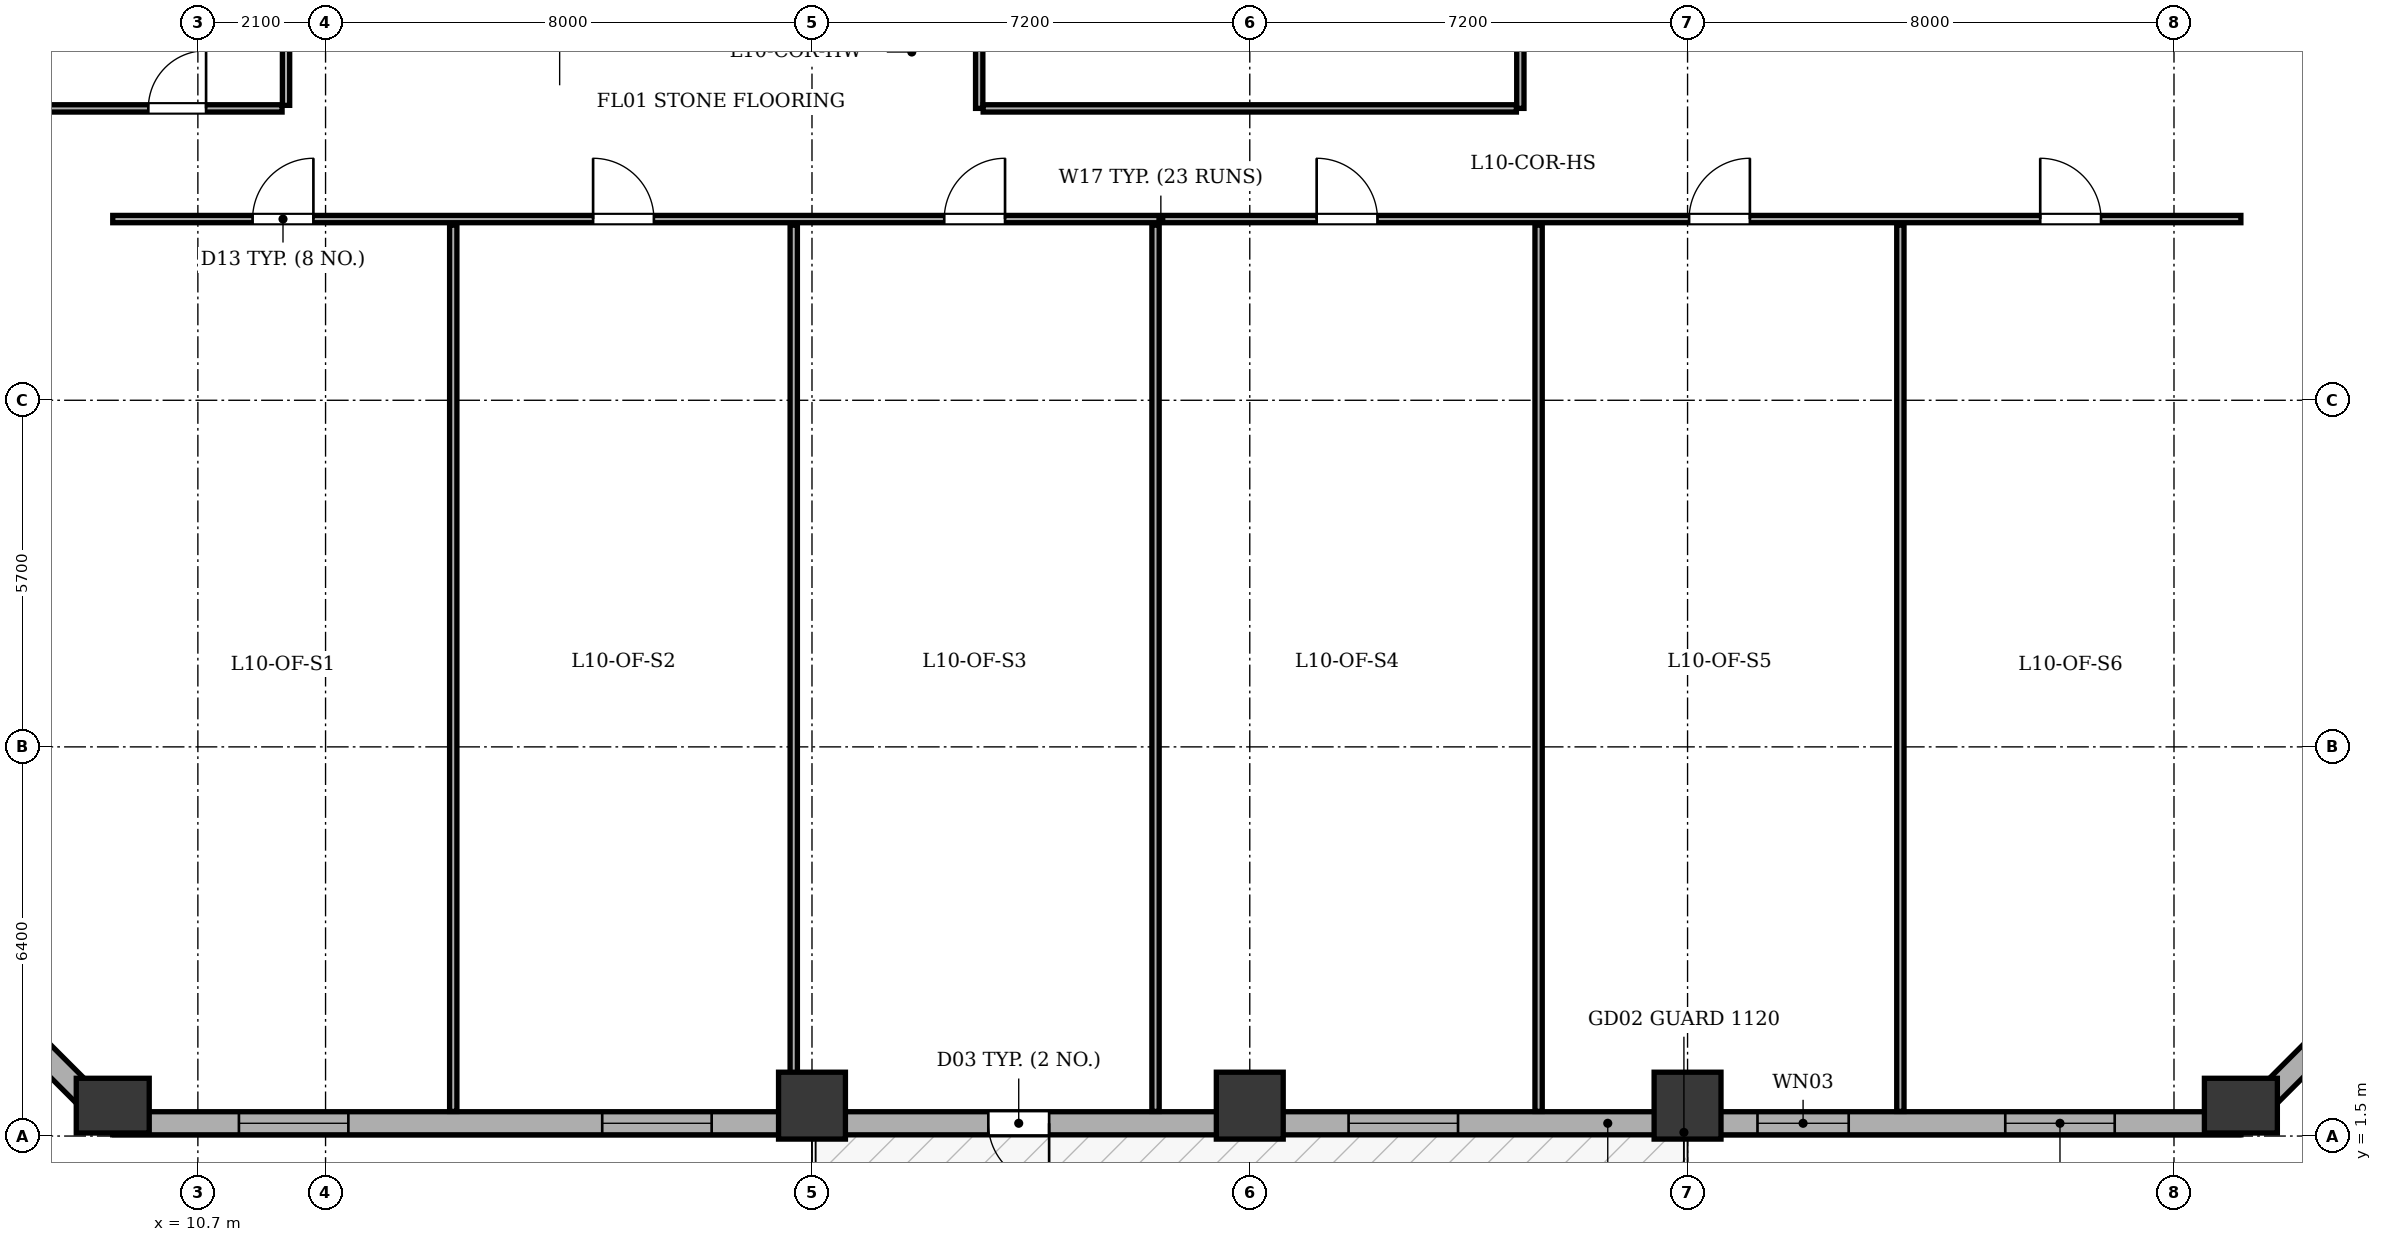
"""IFC4 building model, lengths in metres.
Left out: names, types, materials, properties, quantities, classifications, styles, units other than length and angle.
Written with IfcOpenShell. Run it as: python <this file> out.ifc"""

import sys

from ifc_helpers import new_model, si_unit, direction, frame, frame_2d, origin, origin_2d, place, context, subcontext, project, spatial, rectangle, extrude, element, fill, save


model = new_model("IFC4")
c1 = context("Model", 3, precision=1e-05, world=origin(), true_north=direction((0.0, 1.0)))
c2 = subcontext(c1, "Body", "Model", "MODEL_VIEW")
j1 = project(units=[si_unit("LENGTHUNIT", "METRE"), si_unit("PLANEANGLEUNIT", "RADIAN")], contexts=[c1])
p1 = place(None, origin())
s1 = spatial("IfcSite", under=j1, at=p1, CompositionType="ELEMENT")
p2 = place(p1, origin())
s2 = spatial("IfcBuilding", under=s1, at=p2, CompositionType="ELEMENT")
p3 = place(p2, frame((0.0, 0.0, 43.8)))
s3 = spatial("IfcBuildingStorey", under=s2, at=p3, CompositionType="ELEMENT", Elevation=43.8)
p4 = place(p3, frame((9.3, 2.0, 0.0), z_axis=(0.0, 0.0, 1.0), x_axis=(1.0, 0.0, 0.0)))
e1 = element("IfcColumn", 1, at=p4, inside=s3, PredefinedType="COLUMN", context=c2, shape_type="SweptSolid", body=[
    extrude(rectangle(XDim=0.9, YDim=1.2, at=origin_2d()), origin(), (0.0, 0.0, 1.0), 3.9),
])
for number, where, z_axis, x_axis in (
    (2, (20.8, 2.0, 0.0), (0.0, 0.0, 1.0), (1.0, 0.0, 0.0)),
    (3, (28.0, 2.0, 0.0), (0.0, 0.0, 1.0), (1.0, 0.0, 0.0)),
    (4, (35.2, 2.0, 0.0), (0.0, 0.0, 1.0), (1.0, 0.0, 0.0)),
):
    element("IfcColumn", number, at=place(p3, frame(where, z_axis=z_axis, x_axis=x_axis)), inside=s3, PredefinedType="COLUMN", context=c2, shape_type="SweptSolid", body=[
        extrude(rectangle(XDim=1.1, YDim=1.1, at=origin_2d()), origin(), (0.0, 0.0, 1.0), 3.9),
    ])
p5 = place(p3, frame((44.3, 2.0, 0.0), z_axis=(0.0, 0.0, 1.0), x_axis=(1.0, 0.0, 0.0)))
e5 = element("IfcColumn", 5, at=p5, inside=s3, PredefinedType="COLUMN", context=c2, shape_type="SweptSolid", body=[
    extrude(rectangle(XDim=0.9, YDim=1.2, at=origin_2d()), origin(), (0.0, 0.0, 1.0), 3.9),
])
p6 = place(p3, frame((44.3, 1.71, 0.0), z_axis=(0.0, 0.0, 1.0), x_axis=(-1.0, 0.0, 0.0)))
e6 = element("IfcWall", 6, at=p6, inside=s3, PredefinedType="STANDARD", context=c2, shape_type="SweptSolid", body=[
    extrude(rectangle(XDim=35.0, YDim=0.38, at=frame_2d((17.5, 0.0))), origin(), (0.0, 0.0, 1.0), 2.835),
])
p7 = place(p6, frame((19.6, 0.0, 0.0)))
e7 = element("IfcOpeningElement", 7, at=p7, cuts=e6, PredefinedType="OPENING", context=c2, shape_type="SweptSolid", body=[
    extrude(rectangle(XDim=1.0, YDim=2.02, at=frame_2d((0.5, 1.01))), frame((0.0, 0.2, 0.0), z_axis=(0.0, -1.0, 0.0), x_axis=(1.0, 0.0, 0.0)), (0.0, 0.0, 1.0), 0.4),
])
p8 = place(p6, frame((2.075, 0.0, 0.8)))
e8 = element("IfcOpeningElement", 8, at=p8, cuts=e6, PredefinedType="OPENING", context=c2, shape_type="SweptSolid", body=[
    extrude(rectangle(XDim=1.8, YDim=1.9, at=frame_2d((0.9, 0.95))), frame((0.0, 0.2, 0.0), z_axis=(0.0, -1.0, 0.0), x_axis=(1.0, 0.0, 0.0)), (0.0, 0.0, 1.0), 0.4),
])
p9 = place(p6, frame((6.45, 0.0, 0.8)))
e9 = element("IfcOpeningElement", 9, at=p9, cuts=e6, PredefinedType="OPENING", context=c2, shape_type="SweptSolid", body=[
    extrude(rectangle(XDim=1.5, YDim=1.9, at=frame_2d((0.75, 0.95))), frame((0.0, 0.2, 0.0), z_axis=(0.0, -1.0, 0.0), x_axis=(1.0, 0.0, 0.0)), (0.0, 0.0, 1.0), 0.4),
])
p10 = place(p6, frame((12.875, 0.0, 0.8)))
e10 = element("IfcOpeningElement", 10, at=p10, cuts=e6, PredefinedType="OPENING", context=c2, shape_type="SweptSolid", body=[
    extrude(rectangle(XDim=1.8, YDim=1.9, at=frame_2d((0.9, 0.95))), frame((0.0, 0.2, 0.0), z_axis=(0.0, -1.0, 0.0), x_axis=(1.0, 0.0, 0.0)), (0.0, 0.0, 1.0), 0.4),
])
p11 = place(p6, frame((25.15, 0.0, 0.8)))
e11 = element("IfcOpeningElement", 11, at=p11, cuts=e6, PredefinedType="OPENING", context=c2, shape_type="SweptSolid", body=[
    extrude(rectangle(XDim=1.8, YDim=1.9, at=frame_2d((0.9, 0.95))), frame((0.0, 0.2, 0.0), z_axis=(0.0, -1.0, 0.0), x_axis=(1.0, 0.0, 0.0)), (0.0, 0.0, 1.0), 0.4),
])
p12 = place(p6, frame((31.125, 0.0, 0.8)))
e12 = element("IfcOpeningElement", 12, at=p12, cuts=e6, PredefinedType="OPENING", context=c2, shape_type="SweptSolid", body=[
    extrude(rectangle(XDim=1.8, YDim=1.9, at=frame_2d((0.9, 0.95))), frame((0.0, 0.2, 0.0), z_axis=(0.0, -1.0, 0.0), x_axis=(1.0, 0.0, 0.0)), (0.0, 0.0, 1.0), 0.4),
])
p13 = place(p3, frame((9.3, 1.71, 0.0), z_axis=(0.0, 0.0, 1.0), x_axis=(-0.707106781187, 0.707106781187, 0.0)))
e13 = element("IfcWall", 13, at=p13, inside=s3, PredefinedType="STANDARD", context=c2, shape_type="SweptSolid", body=[
    extrude(rectangle(XDim=6.774, YDim=0.38, at=frame_2d((3.387, 0.0))), origin(), (0.0, 0.0, 1.0), 2.835),
])
p14 = place(p13, frame((2.687, 0.0, 0.8)))
e14 = element("IfcOpeningElement", 14, at=p14, cuts=e13, PredefinedType="OPENING", context=c2, shape_type="SweptSolid", body=[
    extrude(rectangle(XDim=1.4, YDim=1.65, at=frame_2d((0.7, 0.825))), frame((0.0, 0.2, 0.0), z_axis=(0.0, -1.0, 0.0), x_axis=(1.0, 0.0, 0.0)), (0.0, 0.0, 1.0), 0.4),
])
p15 = place(p3, frame((49.09, 6.5, 0.0), z_axis=(0.0, 0.0, 1.0), x_axis=(-0.707106781187, -0.707106781187, 0.0)))
e15 = element("IfcWall", 15, at=p15, inside=s3, PredefinedType="STANDARD", context=c2, shape_type="SweptSolid", body=[
    extrude(rectangle(XDim=6.774, YDim=0.38, at=frame_2d((3.387, 0.0))), origin(), (0.0, 0.0, 1.0), 2.835),
])
p16 = place(p15, frame((2.687, 0.0, 0.8)))
e16 = element("IfcOpeningElement", 16, at=p16, cuts=e15, PredefinedType="OPENING", context=c2, shape_type="SweptSolid", body=[
    extrude(rectangle(XDim=1.4, YDim=1.65, at=frame_2d((0.7, 0.825))), frame((0.0, 0.2, 0.0), z_axis=(0.0, -1.0, 0.0), x_axis=(1.0, 0.0, 0.0)), (0.0, 0.0, 1.0), 0.4),
])
for number, where, z_axis, x_axis in (
    (17, (23.55, 18.4, 0.0), (0.0, 0.0, 1.0), (0.0, 1.0, 0.0)),
    (18, (32.45, 18.4, 0.0), (0.0, 0.0, 1.0), (0.0, 1.0, 0.0)),
):
    element("IfcWall", number, at=place(p3, frame(where, z_axis=z_axis, x_axis=x_axis)), inside=s3, PredefinedType="PARTITIONING", context=c2, shape_type="SweptSolid", body=[
        extrude(rectangle(XDim=3.485, YDim=0.12, at=frame_2d((1.743, 0.0))), origin(), (0.0, 0.0, 1.0), 3.45),
    ])
p17 = place(p3, frame((23.615, 18.4, 0.0), z_axis=(0.0, 0.0, 1.0), x_axis=(1.0, 0.0, 0.0)))
e19 = element("IfcWall", 19, at=p17, inside=s3, PredefinedType="PARTITIONING", context=c2, shape_type="SweptSolid", body=[
    extrude(rectangle(XDim=8.77, YDim=0.12, at=frame_2d((4.385, 0.0))), origin(), (0.0, 0.0, 1.0), 3.45),
])
p18 = place(p3, frame((9.3, 16.58, 0.0), z_axis=(0.0, 0.0, 1.0), x_axis=(1.0, 0.0, 0.0)))
e20 = element("IfcWall", 20, at=p18, inside=s3, PredefinedType="PARTITIONING", context=c2, shape_type="SweptSolid", body=[
    extrude(rectangle(XDim=35.0, YDim=0.12, at=frame_2d((17.5, 0.0))), origin(), (0.0, 0.0, 1.0), 3.45),
])
p19 = place(p18, frame((2.3, 0.0, 0.0)))
e21 = element("IfcOpeningElement", 21, at=p19, cuts=e20, PredefinedType="OPENING", context=c2, shape_type="SweptSolid", body=[
    extrude(rectangle(XDim=1.0, YDim=2.1, at=frame_2d((0.5, 1.05))), frame((0.0, 0.07, 0.0), z_axis=(0.0, -1.0, 0.0), x_axis=(1.0, 0.0, 0.0)), (0.0, 0.0, 1.0), 0.14),
])
p20 = place(p18, frame((7.9, 0.0, 0.0)))
e22 = element("IfcOpeningElement", 22, at=p20, cuts=e20, PredefinedType="OPENING", context=c2, shape_type="SweptSolid", body=[
    extrude(rectangle(XDim=1.0, YDim=2.1, at=frame_2d((0.5, 1.05))), frame((0.0, 0.07, 0.0), z_axis=(0.0, -1.0, 0.0), x_axis=(1.0, 0.0, 0.0)), (0.0, 0.0, 1.0), 0.14),
])
p21 = place(p18, frame((13.675, 0.0, 0.0)))
e23 = element("IfcOpeningElement", 23, at=p21, cuts=e20, PredefinedType="OPENING", context=c2, shape_type="SweptSolid", body=[
    extrude(rectangle(XDim=1.0, YDim=2.1, at=frame_2d((0.5, 1.05))), frame((0.0, 0.07, 0.0), z_axis=(0.0, -1.0, 0.0), x_axis=(1.0, 0.0, 0.0)), (0.0, 0.0, 1.0), 0.14),
])
p22 = place(p18, frame((19.8, 0.0, 0.0)))
e24 = element("IfcOpeningElement", 24, at=p22, cuts=e20, PredefinedType="OPENING", context=c2, shape_type="SweptSolid", body=[
    extrude(rectangle(XDim=1.0, YDim=2.1, at=frame_2d((0.5, 1.05))), frame((0.0, 0.07, 0.0), z_axis=(0.0, -1.0, 0.0), x_axis=(1.0, 0.0, 0.0)), (0.0, 0.0, 1.0), 0.14),
])
p23 = place(p18, frame((25.925, 0.0, 0.0)))
e25 = element("IfcOpeningElement", 25, at=p23, cuts=e20, PredefinedType="OPENING", context=c2, shape_type="SweptSolid", body=[
    extrude(rectangle(XDim=1.0, YDim=2.1, at=frame_2d((0.5, 1.05))), frame((0.0, 0.07, 0.0), z_axis=(0.0, -1.0, 0.0), x_axis=(1.0, 0.0, 0.0)), (0.0, 0.0, 1.0), 0.14),
])
p24 = place(p18, frame((31.7, 0.0, 0.0)))
e26 = element("IfcOpeningElement", 26, at=p24, cuts=e20, PredefinedType="OPENING", context=c2, shape_type="SweptSolid", body=[
    extrude(rectangle(XDim=1.0, YDim=2.1, at=frame_2d((0.5, 1.05))), frame((0.0, 0.07, 0.0), z_axis=(0.0, -1.0, 0.0), x_axis=(1.0, 0.0, 0.0)), (0.0, 0.0, 1.0), 0.14),
])
for number, where, z_axis, x_axis in (
    (27, (14.9, 1.905, 0.0), (0.0, 0.0, 1.0), (0.0, 1.0, 0.0)),
    (28, (20.5, 1.905, 0.0), (0.0, 0.0, 1.0), (0.0, 1.0, 0.0)),
    (29, (26.45, 1.905, 0.0), (0.0, 0.0, 1.0), (0.0, 1.0, 0.0)),
    (30, (32.75, 1.905, 0.0), (0.0, 0.0, 1.0), (0.0, 1.0, 0.0)),
    (31, (38.7, 1.905, 0.0), (0.0, 0.0, 1.0), (0.0, 1.0, 0.0)),
):
    element("IfcWall", number, at=place(p3, frame(where, z_axis=z_axis, x_axis=x_axis)), inside=s3, PredefinedType="PARTITIONING", context=c2, shape_type="SweptSolid", body=[
        extrude(rectangle(XDim=14.575, YDim=0.12, at=frame_2d((7.288, 0.0))), origin(), (0.0, 0.0, 1.0), 3.45),
    ])
p25 = place(p3, frame((12.15, 18.45, 0.0), z_axis=(0.0, 0.0, 1.0), x_axis=(0.0, 1.0, 0.0)))
e32 = element("IfcWall", 32, at=p25, inside=s3, PredefinedType="PARTITIONING", context=c2, shape_type="SweptSolid", body=[
    extrude(rectangle(XDim=17.5, YDim=0.12, at=frame_2d((8.75, 0.0))), origin(), (0.0, 0.0, 1.0), 3.45),
])
p26 = place(p3, frame((4.705, 18.4, 0.0), z_axis=(0.0, 0.0, 1.0), x_axis=(1.0, 0.0, 0.0)))
e33 = element("IfcWall", 33, at=p26, inside=s3, PredefinedType="PARTITIONING", context=c2, shape_type="SweptSolid", body=[
    extrude(rectangle(XDim=7.38, YDim=0.12, at=frame_2d((3.69, 0.0))), origin(), (0.0, 0.0, 1.0), 3.45),
])
p27 = place(p26, frame((5.18, 0.0, 0.0)))
e34 = element("IfcOpeningElement", 34, at=p27, cuts=e33, PredefinedType="OPENING", context=c2, shape_type="SweptSolid", body=[
    extrude(rectangle(XDim=0.95, YDim=2.1, at=frame_2d((0.475, 1.05))), frame((0.0, 0.07, 0.0), z_axis=(0.0, -1.0, 0.0), x_axis=(1.0, 0.0, 0.0)), (0.0, 0.0, 1.0), 0.14),
])
p28 = place(p7, origin())
e35 = element("IfcDoor", 35, at=p28, inside=s3, OperationType="SINGLE_SWING_LEFT", PredefinedType="DOOR", context=c2, shape_type="SweptSolid", body=[
    extrude(rectangle(XDim=1.0, YDim=2.02, at=frame_2d((0.5, 1.01))), frame((0.0, 0.025, 0.0), z_axis=(0.0, -1.0, 0.0), x_axis=(1.0, 0.0, 0.0)), (0.0, 0.0, 1.0), 0.05),
])
fill(e7, e35)
p29 = place(p8, origin())
e36 = element("IfcWindow", 36, at=p29, inside=s3, PartitioningType="SINGLE_PANEL", PredefinedType="WINDOW", context=c2, shape_type="SweptSolid", body=[
    extrude(rectangle(XDim=1.8, YDim=1.9, at=frame_2d((0.9, 0.95))), frame((0.0, -0.01, 0.0), z_axis=(0.0, -1.0, 0.0), x_axis=(1.0, 0.0, 0.0)), (0.0, 0.0, 1.0), 0.06),
])
fill(e8, e36)
p30 = place(p9, origin())
e37 = element("IfcWindow", 37, at=p30, inside=s3, PartitioningType="SINGLE_PANEL", PredefinedType="WINDOW", context=c2, shape_type="SweptSolid", body=[
    extrude(rectangle(XDim=1.5, YDim=1.9, at=frame_2d((0.75, 0.95))), frame((0.0, -0.01, 0.0), z_axis=(0.0, -1.0, 0.0), x_axis=(1.0, 0.0, 0.0)), (0.0, 0.0, 1.0), 0.06),
])
fill(e9, e37)
p31 = place(p10, origin())
e38 = element("IfcWindow", 38, at=p31, inside=s3, PartitioningType="SINGLE_PANEL", PredefinedType="WINDOW", context=c2, shape_type="SweptSolid", body=[
    extrude(rectangle(XDim=1.8, YDim=1.9, at=frame_2d((0.9, 0.95))), frame((0.0, -0.01, 0.0), z_axis=(0.0, -1.0, 0.0), x_axis=(1.0, 0.0, 0.0)), (0.0, 0.0, 1.0), 0.06),
])
fill(e10, e38)
p32 = place(p11, origin())
e39 = element("IfcWindow", 39, at=p32, inside=s3, PartitioningType="SINGLE_PANEL", PredefinedType="WINDOW", context=c2, shape_type="SweptSolid", body=[
    extrude(rectangle(XDim=1.8, YDim=1.9, at=frame_2d((0.9, 0.95))), frame((0.0, -0.01, 0.0), z_axis=(0.0, -1.0, 0.0), x_axis=(1.0, 0.0, 0.0)), (0.0, 0.0, 1.0), 0.06),
])
fill(e11, e39)
p33 = place(p12, origin())
e40 = element("IfcWindow", 40, at=p33, inside=s3, PartitioningType="SINGLE_PANEL", PredefinedType="WINDOW", context=c2, shape_type="SweptSolid", body=[
    extrude(rectangle(XDim=1.8, YDim=1.9, at=frame_2d((0.9, 0.95))), frame((0.0, -0.01, 0.0), z_axis=(0.0, -1.0, 0.0), x_axis=(1.0, 0.0, 0.0)), (0.0, 0.0, 1.0), 0.06),
])
fill(e12, e40)
p34 = place(p19, origin())
e41 = element("IfcDoor", 41, at=p34, inside=s3, OperationType="SINGLE_SWING_RIGHT", PredefinedType="DOOR", context=c2, shape_type="SweptSolid", body=[
    extrude(rectangle(XDim=1.0, YDim=2.1, at=frame_2d((0.5, 1.05))), frame((0.0, 0.025, 0.0), z_axis=(0.0, -1.0, 0.0), x_axis=(1.0, 0.0, 0.0)), (0.0, 0.0, 1.0), 0.05),
])
fill(e21, e41)
p35 = place(p20, origin())
e42 = element("IfcDoor", 42, at=p35, inside=s3, OperationType="SINGLE_SWING_LEFT", PredefinedType="DOOR", context=c2, shape_type="SweptSolid", body=[
    extrude(rectangle(XDim=1.0, YDim=2.1, at=frame_2d((0.5, 1.05))), frame((0.0, 0.025, 0.0), z_axis=(0.0, -1.0, 0.0), x_axis=(1.0, 0.0, 0.0)), (0.0, 0.0, 1.0), 0.05),
])
fill(e22, e42)
p36 = place(p21, origin())
e43 = element("IfcDoor", 43, at=p36, inside=s3, OperationType="SINGLE_SWING_RIGHT", PredefinedType="DOOR", context=c2, shape_type="SweptSolid", body=[
    extrude(rectangle(XDim=1.0, YDim=2.1, at=frame_2d((0.5, 1.05))), frame((0.0, 0.025, 0.0), z_axis=(0.0, -1.0, 0.0), x_axis=(1.0, 0.0, 0.0)), (0.0, 0.0, 1.0), 0.05),
])
fill(e23, e43)
p37 = place(p22, origin())
e44 = element("IfcDoor", 44, at=p37, inside=s3, OperationType="SINGLE_SWING_LEFT", PredefinedType="DOOR", context=c2, shape_type="SweptSolid", body=[
    extrude(rectangle(XDim=1.0, YDim=2.1, at=frame_2d((0.5, 1.05))), frame((0.0, 0.025, 0.0), z_axis=(0.0, -1.0, 0.0), x_axis=(1.0, 0.0, 0.0)), (0.0, 0.0, 1.0), 0.05),
])
fill(e24, e44)
p38 = place(p23, origin())
e45 = element("IfcDoor", 45, at=p38, inside=s3, OperationType="SINGLE_SWING_RIGHT", PredefinedType="DOOR", context=c2, shape_type="SweptSolid", body=[
    extrude(rectangle(XDim=1.0, YDim=2.1, at=frame_2d((0.5, 1.05))), frame((0.0, 0.025, 0.0), z_axis=(0.0, -1.0, 0.0), x_axis=(1.0, 0.0, 0.0)), (0.0, 0.0, 1.0), 0.05),
])
fill(e25, e45)
p39 = place(p24, origin())
e46 = element("IfcDoor", 46, at=p39, inside=s3, OperationType="SINGLE_SWING_LEFT", PredefinedType="DOOR", context=c2, shape_type="SweptSolid", body=[
    extrude(rectangle(XDim=1.0, YDim=2.1, at=frame_2d((0.5, 1.05))), frame((0.0, 0.025, 0.0), z_axis=(0.0, -1.0, 0.0), x_axis=(1.0, 0.0, 0.0)), (0.0, 0.0, 1.0), 0.05),
])
fill(e26, e46)
p40 = place(p27, origin())
e47 = element("IfcDoor", 47, at=p40, inside=s3, OperationType="SINGLE_SWING_RIGHT", PredefinedType="DOOR", context=c2, shape_type="SweptSolid", body=[
    extrude(rectangle(XDim=0.95, YDim=2.1, at=frame_2d((0.475, 1.05))), frame((0.0, 0.025, 0.0), z_axis=(0.0, -1.0, 0.0), x_axis=(1.0, 0.0, 0.0)), (0.0, 0.0, 1.0), 0.05),
])
fill(e34, e47)
save(model, sys.argv[1])
